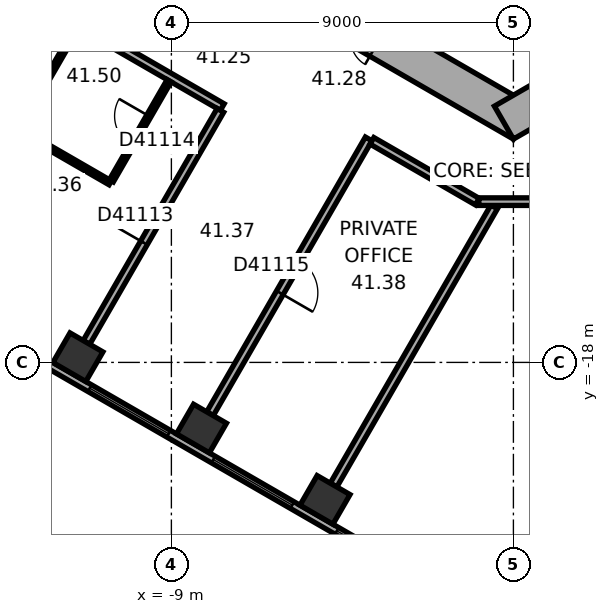
"""IFC4 building model, lengths in metres.
Left out: names, types, materials, properties, quantities, classifications, styles, units other than length and angle.
Written with IfcOpenShell. Run it as: python <this file> out.ifc"""

import sys

from ifc_helpers import new_model, si_unit, direction, frame, frame_2d, origin, origin_2d, place, context, subcontext, project, spatial, rectangle, extrude, element, fill, save


model = new_model("IFC4")
c1 = context("Model", 3, precision=1e-05, world=origin(), true_north=direction((0.0, 1.0)))
c2 = subcontext(c1, "Body", "Model", "MODEL_VIEW")
j1 = project(units=[si_unit("LENGTHUNIT", "METRE"), si_unit("PLANEANGLEUNIT", "RADIAN")], contexts=[c1])
p1 = place(None, origin())
s1 = spatial("IfcSite", under=j1, at=p1, CompositionType="ELEMENT")
p2 = place(p1, origin())
s2 = spatial("IfcBuilding", under=s1, at=p2, CompositionType="ELEMENT")
p3 = place(p2, frame((0.0, 0.0, 168.8)))
s3 = spatial("IfcBuildingStorey", under=s2, at=p3, CompositionType="ELEMENT", Elevation=168.8)
for number, where, z_axis, x_axis in (
    (1, (-11.46, -17.863, 0.0), (0.0, 0.0, 1.0), (0.866, -0.5, 0.0)),
    (2, (-8.208, -19.74, 0.0), (0.0, 0.0, 1.0), (0.866, -0.5, 0.0)),
    (3, (-4.958, -21.617, 0.0), (0.0, 0.0, 1.0), (0.866, -0.5, 0.0)),
):
    element("IfcColumn", number, at=place(p3, frame(where, z_axis=z_axis, x_axis=x_axis)), inside=s3, PredefinedType="COLUMN", context=c2, shape_type="SweptSolid", body=[
        extrude(rectangle(XDim=1.0, YDim=0.9, at=origin_2d()), origin(), (0.0, 0.0, 1.0), 3.7),
    ])
p4 = place(p3, frame((-10.25, -5.629, 0.0), z_axis=(0.0, 0.0, 1.0), x_axis=(0.866022616891, -0.50000482701, 0.0)))
e4 = element("IfcWall", 4, at=p4, inside=s3, PredefinedType="SHEAR", context=c2, shape_type="SweptSolid", body=[
    extrude(rectangle(XDim=12.125, YDim=1.0, at=frame_2d((6.062, 0.0))), origin(), (0.0, 0.0, 1.0), 3.7),
])
p5 = place(p4, frame((6.262, 0.0, 0.0)))
e5 = element("IfcOpeningElement", 5, at=p5, cuts=e4, PredefinedType="OPENING", context=c2, shape_type="SweptSolid", body=[
    extrude(rectangle(XDim=1.5, YDim=2.1, at=frame_2d((0.75, 1.05))), frame((0.0, 0.51, 0.0), z_axis=(0.0, -1.0, 0.0), x_axis=(1.0, 0.0, 0.0)), (0.0, 0.0, 1.0), 1.02),
])
p6 = place(p4, frame((1.712, 0.0, 0.0)))
e6 = element("IfcOpeningElement", 6, at=p6, cuts=e4, PredefinedType="OPENING", context=c2, shape_type="SweptSolid", body=[
    extrude(rectangle(XDim=1.1, YDim=2.1, at=frame_2d((0.55, 1.05))), frame((0.0, 0.51, 0.0), z_axis=(0.0, -1.0, 0.0), x_axis=(1.0, 0.0, 0.0)), (0.0, 0.0, 1.0), 1.02),
])
p7 = place(p4, frame((4.312, 0.0, 0.0)))
e7 = element("IfcOpeningElement", 7, at=p7, cuts=e4, PredefinedType="OPENING", context=c2, shape_type="SweptSolid", body=[
    extrude(rectangle(XDim=1.1, YDim=2.1, at=frame_2d((0.55, 1.05))), frame((0.0, 0.51, 0.0), z_axis=(0.0, -1.0, 0.0), x_axis=(1.0, 0.0, 0.0)), (0.0, 0.0, 1.0), 1.02),
])
p8 = place(p3, frame((-0.25, -11.691, 0.0), z_axis=(0.0, 0.0, 1.0), x_axis=(0.866022616891, 0.50000482701, 0.0)))
e8 = element("IfcWall", 8, at=p8, inside=s3, PredefinedType="SHEAR", context=c2, shape_type="SweptSolid", body=[
    extrude(rectangle(XDim=12.125, YDim=1.0, at=frame_2d((6.062, 0.0))), origin(), (0.0, 0.0, 1.0), 3.7),
])
p9 = place(p8, frame((2.612, 0.0, 0.0)))
e9 = element("IfcOpeningElement", 9, at=p9, cuts=e8, PredefinedType="OPENING", context=c2, shape_type="SweptSolid", body=[
    extrude(rectangle(XDim=1.1, YDim=2.1, at=frame_2d((0.55, 1.05))), frame((0.0, 0.51, 0.0), z_axis=(0.0, -1.0, 0.0), x_axis=(1.0, 0.0, 0.0)), (0.0, 0.0, 1.0), 1.02),
])
p10 = place(p8, frame((5.212, 0.0, 0.0)))
e10 = element("IfcOpeningElement", 10, at=p10, cuts=e8, PredefinedType="OPENING", context=c2, shape_type="SweptSolid", body=[
    extrude(rectangle(XDim=1.1, YDim=2.1, at=frame_2d((0.55, 1.05))), frame((0.0, 0.51, 0.0), z_axis=(0.0, -1.0, 0.0), x_axis=(1.0, 0.0, 0.0)), (0.0, 0.0, 1.0), 1.02),
])
p11 = place(p8, frame((7.812, 0.0, 0.0)))
e11 = element("IfcOpeningElement", 11, at=p11, cuts=e8, PredefinedType="OPENING", context=c2, shape_type="SweptSolid", body=[
    extrude(rectangle(XDim=1.1, YDim=2.1, at=frame_2d((0.55, 1.05))), frame((0.0, 0.51, 0.0), z_axis=(0.0, -1.0, 0.0), x_axis=(1.0, 0.0, 0.0)), (0.0, 0.0, 1.0), 1.02),
])
p12 = place(p3, frame((-18.789, -14.267, 0.0), z_axis=(0.0, 0.0, 1.0), x_axis=(0.866023315909, -0.500003616288, 0.0)))
e12 = element("IfcWall", 12, at=p12, inside=s3, PredefinedType="STANDARD", context=c2, shape_type="SweptSolid", body=[
    extrude(rectangle(XDim=20.044, YDim=0.2, at=frame_2d((10.022, 0.0))), origin(), (0.0, 0.0, 1.0), 3.7),
])
p13 = place(p12, frame((1.314, 0.0, 0.9)))
e13 = element("IfcOpeningElement", 13, at=p13, cuts=e12, PredefinedType="OPENING", context=c2, shape_type="SweptSolid", body=[
    extrude(rectangle(XDim=2.4, YDim=2.0, at=frame_2d((1.2, 1.0))), frame((0.0, 0.11, 0.0), z_axis=(0.0, -1.0, 0.0), x_axis=(1.0, 0.0, 0.0)), (0.0, 0.0, 1.0), 0.22),
])
p14 = place(p12, frame((5.069, 0.0, 0.9)))
e14 = element("IfcOpeningElement", 14, at=p14, cuts=e12, PredefinedType="OPENING", context=c2, shape_type="SweptSolid", body=[
    extrude(rectangle(XDim=2.4, YDim=2.0, at=frame_2d((1.2, 1.0))), frame((0.0, 0.11, 0.0), z_axis=(0.0, -1.0, 0.0), x_axis=(1.0, 0.0, 0.0)), (0.0, 0.0, 1.0), 0.22),
])
p15 = place(p12, frame((8.823, 0.0, 0.9)))
e15 = element("IfcOpeningElement", 15, at=p15, cuts=e12, PredefinedType="OPENING", context=c2, shape_type="SweptSolid", body=[
    extrude(rectangle(XDim=2.4, YDim=2.0, at=frame_2d((1.2, 1.0))), frame((0.0, 0.11, 0.0), z_axis=(0.0, -1.0, 0.0), x_axis=(1.0, 0.0, 0.0)), (0.0, 0.0, 1.0), 0.22),
])
p16 = place(p12, frame((12.577, 0.0, 0.9)))
e16 = element("IfcOpeningElement", 16, at=p16, cuts=e12, PredefinedType="OPENING", context=c2, shape_type="SweptSolid", body=[
    extrude(rectangle(XDim=2.4, YDim=2.0, at=frame_2d((1.2, 1.0))), frame((0.0, 0.11, 0.0), z_axis=(0.0, -1.0, 0.0), x_axis=(1.0, 0.0, 0.0)), (0.0, 0.0, 1.0), 0.22),
])
p17 = place(p12, frame((16.331, 0.0, 0.9)))
e17 = element("IfcOpeningElement", 17, at=p17, cuts=e12, PredefinedType="OPENING", context=c2, shape_type="SweptSolid", body=[
    extrude(rectangle(XDim=2.4, YDim=2.0, at=frame_2d((1.2, 1.0))), frame((0.0, 0.11, 0.0), z_axis=(0.0, -1.0, 0.0), x_axis=(1.0, 0.0, 0.0)), (0.0, 0.0, 1.0), 0.22),
])
p18 = place(p3, frame((0.013, -8.422, 0.0), z_axis=(0.0, 0.0, 1.0), x_axis=(0.500077893725, -0.86598042715, 0.0)))
e18 = element("IfcWall", 18, at=p18, inside=s3, PredefinedType="PARTITIONING", context=c2, shape_type="SweptSolid", body=[
    extrude(rectangle(XDim=2.2, YDim=0.2, at=frame_2d((1.1, 0.0))), origin(), (0.0, 0.0, 1.0), 3.42),
])
p19 = place(p3, frame((-13.035, -11.875, 0.0), z_axis=(0.0, 0.0, 1.0), x_axis=(0.500026960575, 0.86600983753, 0.0)))
e19 = element("IfcWall", 19, at=p19, inside=s3, PredefinedType="PARTITIONING", context=c2, shape_type="SweptSolid", body=[
    extrude(rectangle(XDim=3.1, YDim=0.12, at=frame_2d((1.55, 0.0))), origin(), (0.0, 0.0, 1.0), 3.42),
])
p20 = place(p3, frame((-11.435, -9.103, 0.0), z_axis=(0.0, 0.0, 1.0), x_axis=(0.866007399799, -0.500031182522, 0.0)))
e20 = element("IfcWall", 20, at=p20, inside=s3, PredefinedType="PARTITIONING", context=c2, shape_type="SweptSolid", body=[
    extrude(rectangle(XDim=4.358, YDim=0.2, at=frame_2d((2.179, 0.0))), origin(), (0.0, 0.0, 1.0), 3.42),
])
p21 = place(p3, frame((-11.235, -17.474, 0.0), z_axis=(0.0, 0.0, 1.0), x_axis=(0.500009260695, 0.866020057054, 0.0)))
e21 = element("IfcWall", 21, at=p21, inside=s3, PredefinedType="PARTITIONING", context=c2, shape_type="SweptSolid", body=[
    extrude(rectangle(XDim=7.049, YDim=0.2, at=frame_2d((3.524, 0.0))), origin(), (0.0, 0.0, 1.0), 2.87),
])
p22 = place(p21, frame((3.024, 0.0, 0.0)))
e22 = element("IfcOpeningElement", 22, at=p22, cuts=e21, PredefinedType="OPENING", context=c2, shape_type="SweptSolid", body=[
    extrude(rectangle(XDim=1.0, YDim=2.1, at=frame_2d((0.5, 1.05))), frame((0.0, 0.11, 0.0), z_axis=(0.0, -1.0, 0.0), x_axis=(1.0, 0.0, 0.0)), (0.0, 0.0, 1.0), 0.22),
])
p23 = place(p3, frame((-10.61, -13.275, 0.0), z_axis=(0.0, 0.0, 1.0), x_axis=(-0.866019409031, 0.500010383074, 0.0)))
e23 = element("IfcWall", 23, at=p23, inside=s3, PredefinedType="PARTITIONING", context=c2, shape_type="SweptSolid", body=[
    extrude(rectangle(XDim=2.74, YDim=0.12, at=frame_2d((1.37, 0.0))), origin(), (0.0, 0.0, 1.0), 3.42),
])
p24 = place(p3, frame((-9.06, -10.59, 0.0), z_axis=(0.0, 0.0, 1.0), x_axis=(-0.49993101378, -0.866065229334, 0.0)))
e24 = element("IfcWall", 24, at=p24, inside=s3, PredefinedType="PARTITIONING", context=c2, shape_type="SweptSolid", body=[
    extrude(rectangle(XDim=3.04, YDim=0.12, at=frame_2d((1.52, 0.0))), origin(), (0.0, 0.0, 1.0), 3.42),
])
p25 = place(p24, frame((1.07, 0.0, 0.0)))
e25 = element("IfcOpeningElement", 25, at=p25, cuts=e24, PredefinedType="OPENING", context=c2, shape_type="SweptSolid", body=[
    extrude(rectangle(XDim=0.9, YDim=2.1, at=frame_2d((0.45, 1.05))), frame((0.0, 0.07, 0.0), z_axis=(0.0, -1.0, 0.0), x_axis=(1.0, 0.0, 0.0)), (0.0, 0.0, 1.0), 0.14),
])
p26 = place(p3, frame((-7.984, -19.351, 0.0), z_axis=(0.0, 0.0, 1.0), x_axis=(0.500010139422, 0.866019549707, 0.0)))
e26 = element("IfcWall", 26, at=p26, inside=s3, PredefinedType="PARTITIONING", context=c2, shape_type="SweptSolid", body=[
    extrude(rectangle(XDim=8.35, YDim=0.2, at=frame_2d((4.175, 0.0))), origin(), (0.0, 0.0, 1.0), 3.42),
])
p27 = place(p26, frame((3.675, 0.0, 0.0)))
e27 = element("IfcOpeningElement", 27, at=p27, cuts=e26, PredefinedType="OPENING", context=c2, shape_type="SweptSolid", body=[
    extrude(rectangle(XDim=1.0, YDim=2.1, at=frame_2d((0.5, 1.05))), frame((0.0, 0.11, 0.0), z_axis=(0.0, -1.0, 0.0), x_axis=(1.0, 0.0, 0.0)), (0.0, 0.0, 1.0), 0.22),
])
p28 = place(p3, frame((-4.732, -21.228, 0.0), z_axis=(0.0, 0.0, 1.0), x_axis=(0.500000843414, 0.866024916838, 0.0)))
e28 = element("IfcWall", 28, at=p28, inside=s3, PredefinedType="PARTITIONING", context=c2, shape_type="SweptSolid", body=[
    extrude(rectangle(XDim=8.452, YDim=0.2, at=frame_2d((4.226, 0.0))), origin(), (0.0, 0.0, 1.0), 3.42),
])
p29 = place(p3, frame((-3.722, -12.169, 0.0), z_axis=(0.0, 0.0, 1.0), x_axis=(0.866033163891, -0.499986558861, 0.0)))
e29 = element("IfcWall", 29, at=p29, inside=s3, PredefinedType="PARTITIONING", context=c2, shape_type="SweptSolid", body=[
    extrude(rectangle(XDim=3.201, YDim=0.2, at=frame_2d((1.6, 0.0))), origin(), (0.0, 0.0, 1.0), 3.42),
])
p30 = place(p3, frame((-0.91, -13.77, 0.0), z_axis=(0.0, 0.0, 1.0), x_axis=(1.0, 0.0, 0.0)))
e30 = element("IfcWall", 30, at=p30, inside=s3, PredefinedType="PARTITIONING", context=c2, shape_type="SweptSolid", body=[
    extrude(rectangle(XDim=1.86, YDim=0.2, at=frame_2d((0.93, 0.0))), origin(), (0.0, 0.0, 1.0), 3.42),
])
p31 = place(p15, origin())
e31 = element("IfcWindow", 31, at=p31, inside=s3, PartitioningType="SINGLE_PANEL", PredefinedType="WINDOW", context=c2, shape_type="SweptSolid", body=[
    extrude(rectangle(XDim=2.4, YDim=2.0, at=frame_2d((1.2, 1.0))), frame((0.0, 0.03, 0.0), z_axis=(0.0, -1.0, 0.0), x_axis=(1.0, 0.0, 0.0)), (0.0, 0.0, 1.0), 0.06),
])
fill(e15, e31)
p32 = place(p16, origin())
e32 = element("IfcWindow", 32, at=p32, inside=s3, PartitioningType="SINGLE_PANEL", PredefinedType="WINDOW", context=c2, shape_type="SweptSolid", body=[
    extrude(rectangle(XDim=2.4, YDim=2.0, at=frame_2d((1.2, 1.0))), frame((0.0, 0.03, 0.0), z_axis=(0.0, -1.0, 0.0), x_axis=(1.0, 0.0, 0.0)), (0.0, 0.0, 1.0), 0.06),
])
fill(e16, e32)
p33 = place(p17, origin())
e33 = element("IfcWindow", 33, at=p33, inside=s3, PartitioningType="SINGLE_PANEL", PredefinedType="WINDOW", context=c2, shape_type="SweptSolid", body=[
    extrude(rectangle(XDim=2.4, YDim=2.0, at=frame_2d((1.2, 1.0))), frame((0.0, 0.03, 0.0), z_axis=(0.0, -1.0, 0.0), x_axis=(1.0, 0.0, 0.0)), (0.0, 0.0, 1.0), 0.06),
])
fill(e17, e33)
p34 = place(p22, origin())
e34 = element("IfcDoor", 34, at=p34, inside=s3, OperationType="SINGLE_SWING_LEFT", PredefinedType="DOOR", context=c2, shape_type="SweptSolid", body=[
    extrude(rectangle(XDim=1.0, YDim=2.1, at=frame_2d((0.5, 1.05))), frame((0.0, 0.025, 0.0), z_axis=(0.0, -1.0, 0.0), x_axis=(1.0, 0.0, 0.0)), (0.0, 0.0, 1.0), 0.05),
])
fill(e22, e34)
p35 = place(p25, origin())
e35 = element("IfcDoor", 35, at=p35, inside=s3, OperationType="SINGLE_SWING_LEFT", PredefinedType="DOOR", context=c2, shape_type="SweptSolid", body=[
    extrude(rectangle(XDim=0.9, YDim=2.1, at=frame_2d((0.45, 1.05))), frame((0.0, 0.025, 0.0), z_axis=(0.0, -1.0, 0.0), x_axis=(1.0, 0.0, 0.0)), (0.0, 0.0, 1.0), 0.05),
])
fill(e25, e35)
p36 = place(p27, origin())
e36 = element("IfcDoor", 36, at=p36, inside=s3, OperationType="SINGLE_SWING_LEFT", PredefinedType="DOOR", context=c2, shape_type="SweptSolid", body=[
    extrude(rectangle(XDim=1.0, YDim=2.1, at=frame_2d((0.5, 1.05))), frame((0.0, 0.025, 0.0), z_axis=(0.0, -1.0, 0.0), x_axis=(1.0, 0.0, 0.0)), (0.0, 0.0, 1.0), 0.05),
])
fill(e27, e36)
save(model, sys.argv[1])
